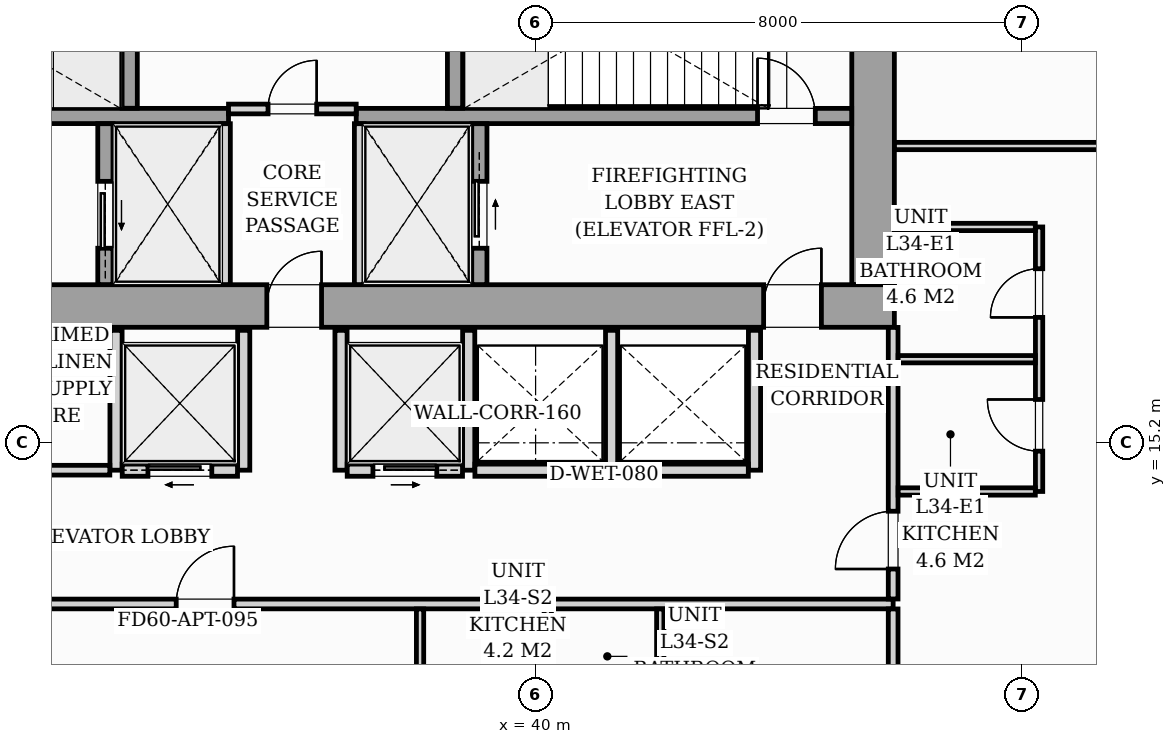
"""IFC4 building model, lengths in metres.
Left out: names, types, materials, properties, quantities, classifications, styles, units other than length and angle.
Written with IfcOpenShell. Run it as: python <this file> out.ifc"""

import sys

from ifc_helpers import new_model, si_unit, direction, frame, frame_2d, origin, origin_2d, place, context, subcontext, project, spatial, rectangle, i_section, extrude, source, transform, mapped, element, fill, save


model = new_model("IFC4")
c1 = context("Model", 3, precision=1e-05, world=origin(), true_north=direction((0.0, 1.0)))
c2 = subcontext(c1, "Body", "Model", "MODEL_VIEW")
j1 = project(units=[si_unit("LENGTHUNIT", "METRE"), si_unit("PLANEANGLEUNIT", "RADIAN")], contexts=[c1])
p1 = place(None, origin())
s1 = spatial("IfcSite", under=j1, at=p1, CompositionType="ELEMENT")
p2 = place(p1, origin())
s2 = spatial("IfcBuilding", under=s1, at=p2, CompositionType="ELEMENT")
p3 = place(p2, frame((0.0, 0.0, 119.4)))
s3 = spatial("IfcBuildingStorey", under=s2, at=p3, CompositionType="ELEMENT", Elevation=119.4)
m1 = source(origin(), c2, "Body", "SweptSolid", [
    extrude(i_section(OverallWidth=0.421, OverallDepth=0.465, WebThickness=0.045, FlangeThickness=0.073, FilletRadius=0.018, at=origin_2d()), origin(), (0.0, 0.0, 1.0), 5.196),
])
for number, where, z_axis, x_axis in (
    (1, (33.12, 17.4, 0.002), (0.0, 0.0, 1.0), (1.0, 0.0, 0.0)),
    (2, (38.88, 17.4, 0.002), (0.0, 0.0, 1.0), (1.0, 0.0, 0.0)),
    (3, (45.6, 17.4, 0.002), (0.0, 0.0, 1.0), (1.0, 0.0, 0.0)),
):
    element("IfcColumn", number, at=place(p3, frame(where, z_axis=z_axis, x_axis=x_axis)), inside=s3, PredefinedType="PILASTER", context=c2, shape_type="MappedRepresentation", body=[
        mapped(m1, transform((0.0, 0.0, 0.0), scale=1.0)),
    ])
p4 = place(p3, frame((26.1, 17.45, 0.0), z_axis=(0.0, 0.0, 1.0), x_axis=(1.0, 0.0, 0.0)))
e4 = element("IfcWall", 4, at=p4, inside=s3, PredefinedType="SHEAR", context=c2, shape_type="SweptSolid", body=[
    extrude(rectangle(XDim=19.8, YDim=0.7, at=frame_2d((9.9, 0.0))), origin(), (0.0, 0.0, 1.0), 5.2),
])
p5 = place(p4, frame((1.05, 0.0, 0.0)))
e5 = element("IfcOpeningElement", 5, at=p5, cuts=e4, PredefinedType="OPENING", context=c2, shape_type="SweptSolid", body=[
    extrude(rectangle(XDim=0.95, YDim=2.06, at=frame_2d((0.475, 1.03))), frame((0.0, 0.36, 0.0), z_axis=(0.0, -1.0, 0.0), x_axis=(1.0, 0.0, 0.0)), (0.0, 0.0, 1.0), 0.72),
])
p6 = place(p4, frame((9.48, 0.0, 0.0)))
e6 = element("IfcOpeningElement", 6, at=p6, cuts=e4, PredefinedType="OPENING", context=c2, shape_type="SweptSolid", body=[
    extrude(rectangle(XDim=0.9, YDim=2.06, at=frame_2d((0.45, 1.03))), frame((0.0, 0.36, 0.0), z_axis=(0.0, -1.0, 0.0), x_axis=(1.0, 0.0, 0.0)), (0.0, 0.0, 1.0), 0.72),
])
p7 = place(p4, frame((17.65, 0.0, 0.0)))
e7 = element("IfcOpeningElement", 7, at=p7, cuts=e4, PredefinedType="OPENING", context=c2, shape_type="SweptSolid", body=[
    extrude(rectangle(XDim=0.95, YDim=2.06, at=frame_2d((0.475, 1.03))), frame((0.0, 0.36, 0.0), z_axis=(0.0, -1.0, 0.0), x_axis=(1.0, 0.0, 0.0)), (0.0, 0.0, 1.0), 0.72),
])
p8 = place(p3, frame((45.55, 17.802, 0.0), z_axis=(0.0, 0.0, 1.0), x_axis=(0.0, 1.0, 0.0)))
e8 = element("IfcWall", 8, at=p8, inside=s3, PredefinedType="SHEAR", context=c2, shape_type="SweptSolid", body=[
    extrude(rectangle(XDim=5.796, YDim=0.7, at=frame_2d((2.898, 0.0))), origin(), (0.0, 0.0, 1.0), 5.2),
])
p9 = place(p3, frame((26.802, 20.575, 0.0), z_axis=(0.0, 0.0, 1.0), x_axis=(1.0, 0.0, 0.0)))
e9 = element("IfcWall", 9, at=p9, inside=s3, PredefinedType="SOLIDWALL", context=c2, shape_type="SweptSolid", body=[
    extrude(rectangle(XDim=8.148, YDim=0.25, at=frame_2d((4.074, 0.0))), origin(), (0.0, 0.0, 1.0), 5.2),
])
p10 = place(p9, frame((0.348, 0.0, 0.0)))
e10 = element("IfcOpeningElement", 10, at=p10, cuts=e9, PredefinedType="OPENING", context=c2, shape_type="SweptSolid", body=[
    extrude(rectangle(XDim=0.95, YDim=2.06, at=frame_2d((0.475, 1.03))), frame((0.0, 0.135, 0.0), z_axis=(0.0, -1.0, 0.0), x_axis=(1.0, 0.0, 0.0)), (0.0, 0.0, 1.0), 0.27),
])
p11 = place(p3, frame((37.05, 20.575, 0.0), z_axis=(0.0, 0.0, 1.0), x_axis=(1.0, 0.0, 0.0)))
e11 = element("IfcWall", 11, at=p11, inside=s3, PredefinedType="SOLIDWALL", context=c2, shape_type="SweptSolid", body=[
    extrude(rectangle(XDim=8.148, YDim=0.25, at=frame_2d((4.074, 0.0))), origin(), (0.0, 0.0, 1.0), 5.2),
])
p12 = place(p11, frame((6.6, 0.0, 0.0)))
e12 = element("IfcOpeningElement", 12, at=p12, cuts=e11, PredefinedType="OPENING", context=c2, shape_type="SweptSolid", body=[
    extrude(rectangle(XDim=0.95, YDim=2.06, at=frame_2d((0.475, 1.03))), frame((0.0, 0.135, 0.0), z_axis=(0.0, -1.0, 0.0), x_axis=(1.0, 0.0, 0.0)), (0.0, 0.0, 1.0), 0.27),
])
for number, where, z_axis, x_axis in (
    (13, (33.325, 20.702, 0.0), (0.0, 0.0, 1.0), (0.0, 1.0, 0.0)),
    (14, (38.675, 20.702, 0.0), (0.0, 0.0, 1.0), (0.0, 1.0, 0.0)),
):
    element("IfcWall", number, at=place(p3, frame(where, z_axis=z_axis, x_axis=x_axis)), inside=s3, PredefinedType="SOLIDWALL", context=c2, shape_type="SweptSolid", body=[
        extrude(rectangle(XDim=2.896, YDim=0.25, at=frame_2d((1.448, 0.0))), origin(), (0.0, 0.0, 1.0), 5.2),
    ])
p13 = place(p3, frame((32.925, 17.802, 0.0), z_axis=(0.0, 0.0, 1.0), x_axis=(0.0, 1.0, 0.0)))
e15 = element("IfcWall", 15, at=p13, inside=s3, PredefinedType="SOLIDWALL", context=c2, shape_type="SweptSolid", body=[
    extrude(rectangle(XDim=2.646, YDim=0.25, at=frame_2d((1.323, 0.0))), origin(), (0.0, 0.0, 1.0), 5.2),
])
p14 = place(p13, frame((0.598, 0.0, 0.0)))
e16 = element("IfcOpeningElement", 16, at=p14, cuts=e15, PredefinedType="OPENING", context=c2, shape_type="SweptSolid", body=[
    extrude(rectangle(XDim=1.1, YDim=2.08, at=frame_2d((0.55, 1.04))), frame((0.0, 0.135, 0.0), z_axis=(0.0, -1.0, 0.0), x_axis=(1.0, 0.0, 0.0)), (0.0, 0.0, 1.0), 0.27),
])
for number, where, z_axis, x_axis in (
    (17, (34.9, 17.802, 0.0), (0.0, 0.0, 1.0), (0.0, 1.0, 0.0)),
    (18, (37.1, 17.802, 0.0), (0.0, 0.0, 1.0), (0.0, 1.0, 0.0)),
):
    element("IfcWall", number, at=place(p3, frame(where, z_axis=z_axis, x_axis=x_axis)), inside=s3, PredefinedType="PARTITIONING", context=c2, shape_type="SweptSolid", body=[
        extrude(rectangle(XDim=2.646, YDim=0.16, at=frame_2d((1.323, 0.0))), origin(), (0.0, 0.0, 1.0), 4.78),
    ])
p15 = place(p3, frame((39.075, 17.802, 0.0), z_axis=(0.0, 0.0, 1.0), x_axis=(0.0, 1.0, 0.0)))
e19 = element("IfcWall", 19, at=p15, inside=s3, PredefinedType="SOLIDWALL", context=c2, shape_type="SweptSolid", body=[
    extrude(rectangle(XDim=2.646, YDim=0.25, at=frame_2d((1.323, 0.0))), origin(), (0.0, 0.0, 1.0), 5.2),
])
p16 = place(p15, frame((0.598, 0.0, 0.0)))
e20 = element("IfcOpeningElement", 20, at=p16, cuts=e19, PredefinedType="OPENING", context=c2, shape_type="SweptSolid", body=[
    extrude(rectangle(XDim=1.1, YDim=2.08, at=frame_2d((0.55, 1.04))), frame((0.0, 0.135, 0.0), z_axis=(0.0, -1.0, 0.0), x_axis=(1.0, 0.0, 0.0)), (0.0, 0.0, 1.0), 0.27),
])
p17 = place(p3, frame((34.95, 20.69, 0.0), z_axis=(0.0, 0.0, 1.0), x_axis=(1.0, 0.0, 0.0)))
e21 = element("IfcWall", 21, at=p17, inside=s3, PredefinedType="PARTITIONING", context=c2, shape_type="SweptSolid", body=[
    extrude(rectangle(XDim=2.1, YDim=0.16, at=frame_2d((1.05, 0.0))), origin(), (0.0, 0.0, 1.0), 4.78),
])
p18 = place(p17, frame((0.65, 0.0, 0.0)))
e22 = element("IfcOpeningElement", 22, at=p18, cuts=e21, PredefinedType="OPENING", context=c2, shape_type="SweptSolid", body=[
    extrude(rectangle(XDim=0.8, YDim=2.05, at=frame_2d((0.4, 1.025))), frame((0.0, 0.09, 0.0), z_axis=(0.0, -1.0, 0.0), x_axis=(1.0, 0.0, 0.0)), (0.0, 0.0, 1.0), 0.18),
])
p19 = place(p3, frame((33.1, 14.75, 0.0), z_axis=(0.0, 0.0, 1.0), x_axis=(0.0, 1.0, 0.0)))
e23 = element("IfcWall", 23, at=p19, inside=s3, PredefinedType="PARTITIONING", context=c2, shape_type="SweptSolid", body=[
    extrude(rectangle(XDim=2.3, YDim=0.2, at=frame_2d((1.15, 0.0))), origin(), (0.0, 0.0, 1.0), 4.78),
])
p20 = place(p3, frame((28.482, 14.75, 0.0), z_axis=(0.0, 0.0, 1.0), x_axis=(1.0, 0.0, 0.0)))
e24 = element("IfcWall", 24, at=p20, inside=s3, PredefinedType="PARTITIONING", context=c2, shape_type="SweptSolid", body=[
    extrude(rectangle(XDim=4.516, YDim=0.16, at=frame_2d((2.258, 0.0))), origin(), (0.0, 0.0, 1.0), 4.78),
])
p21 = place(p20, frame((1.868, 0.0, 0.0)))
e25 = element("IfcOpeningElement", 25, at=p21, cuts=e24, PredefinedType="OPENING", context=c2, shape_type="SweptSolid", body=[
    extrude(rectangle(XDim=0.8, YDim=2.05, at=frame_2d((0.4, 1.025))), frame((0.0, 0.09, 0.0), z_axis=(0.0, -1.0, 0.0), x_axis=(1.0, 0.0, 0.0)), (0.0, 0.0, 1.0), 0.18),
])
p22 = place(p3, frame((35.2, 14.75, 0.0), z_axis=(0.0, 0.0, 1.0), x_axis=(0.0, 1.0, 0.0)))
e26 = element("IfcWall", 26, at=p22, inside=s3, PredefinedType="PARTITIONING", context=c2, shape_type="SweptSolid", body=[
    extrude(rectangle(XDim=2.3, YDim=0.2, at=frame_2d((1.15, 0.0))), origin(), (0.0, 0.0, 1.0), 4.78),
])
p23 = place(p3, frame((33.202, 14.75, 0.0), z_axis=(0.0, 0.0, 1.0), x_axis=(1.0, 0.0, 0.0)))
e27 = element("IfcWall", 27, at=p23, inside=s3, PredefinedType="PARTITIONING", context=c2, shape_type="SweptSolid", body=[
    extrude(rectangle(XDim=1.896, YDim=0.2, at=frame_2d((0.948, 0.0))), origin(), (0.0, 0.0, 1.0), 4.78),
])
p24 = place(p23, frame((0.423, 0.0, 0.0)))
e28 = element("IfcOpeningElement", 28, at=p24, cuts=e27, PredefinedType="OPENING", context=c2, shape_type="SweptSolid", body=[
    extrude(rectangle(XDim=1.05, YDim=2.08, at=frame_2d((0.525, 1.04))), frame((0.0, 0.11, 0.0), z_axis=(0.0, -1.0, 0.0), x_axis=(1.0, 0.0, 0.0)), (0.0, 0.0, 1.0), 0.22),
])
for number, where, z_axis, x_axis in (
    (29, (36.8, 14.75, 0.0), (0.0, 0.0, 1.0), (0.0, 1.0, 0.0)),
    (30, (38.9, 14.75, 0.0), (0.0, 0.0, 1.0), (0.0, 1.0, 0.0)),
):
    element("IfcWall", number, at=place(p3, frame(where, z_axis=z_axis, x_axis=x_axis)), inside=s3, PredefinedType="PARTITIONING", context=c2, shape_type="SweptSolid", body=[
        extrude(rectangle(XDim=2.3, YDim=0.2, at=frame_2d((1.15, 0.0))), origin(), (0.0, 0.0, 1.0), 4.78),
    ])
p25 = place(p3, frame((36.902, 14.75, 0.0), z_axis=(0.0, 0.0, 1.0), x_axis=(1.0, 0.0, 0.0)))
e31 = element("IfcWall", 31, at=p25, inside=s3, PredefinedType="PARTITIONING", context=c2, shape_type="SweptSolid", body=[
    extrude(rectangle(XDim=1.896, YDim=0.2, at=frame_2d((0.948, 0.0))), origin(), (0.0, 0.0, 1.0), 4.78),
])
p26 = place(p25, frame((0.423, 0.0, 0.0)))
e32 = element("IfcOpeningElement", 32, at=p26, cuts=e31, PredefinedType="OPENING", context=c2, shape_type="SweptSolid", body=[
    extrude(rectangle(XDim=1.05, YDim=2.08, at=frame_2d((0.525, 1.04))), frame((0.0, 0.11, 0.0), z_axis=(0.0, -1.0, 0.0), x_axis=(1.0, 0.0, 0.0)), (0.0, 0.0, 1.0), 0.22),
])
for number, where, z_axis, x_axis in (
    (33, (41.25, 14.75, 0.0), (0.0, 0.0, 1.0), (0.0, 1.0, 0.0)),
    (34, (43.6, 14.75, 0.0), (0.0, 0.0, 1.0), (0.0, 1.0, 0.0)),
):
    element("IfcWall", number, at=place(p3, frame(where, z_axis=z_axis, x_axis=x_axis)), inside=s3, PredefinedType="PARTITIONING", context=c2, shape_type="SweptSolid", body=[
        extrude(rectangle(XDim=2.3, YDim=0.2, at=frame_2d((1.15, 0.0))), origin(), (0.0, 0.0, 1.0), 4.78),
    ])
for number, where, z_axis, x_axis in (
    (35, (39.002, 14.75, 0.0), (0.0, 0.0, 1.0), (1.0, 0.0, 0.0)),
    (36, (41.352, 14.75, 0.0), (0.0, 0.0, 1.0), (1.0, 0.0, 0.0)),
):
    element("IfcWall", number, at=place(p3, frame(where, z_axis=z_axis, x_axis=x_axis)), inside=s3, PredefinedType="PARTITIONING", context=c2, shape_type="SweptSolid", body=[
        extrude(rectangle(XDim=2.146, YDim=0.2, at=frame_2d((1.073, 0.0))), origin(), (0.0, 0.0, 1.0), 4.78),
    ])
p27 = place(p3, frame((22.05, 12.55, 0.0), z_axis=(0.0, 0.0, 1.0), x_axis=(1.0, 0.0, 0.0)))
e37 = element("IfcWall", 37, at=p27, inside=s3, PredefinedType="PARTITIONING", context=c2, shape_type="SweptSolid", body=[
    extrude(rectangle(XDim=23.83, YDim=0.16, at=frame_2d((11.915, 0.0))), origin(), (0.0, 0.0, 1.0), 4.78),
])
p28 = place(p27, frame((0.655, 0.0, 0.0)))
e38 = element("IfcOpeningElement", 38, at=p28, cuts=e37, PredefinedType="OPENING", context=c2, shape_type="SweptSolid", body=[
    extrude(rectangle(XDim=0.95, YDim=2.06, at=frame_2d((0.475, 1.03))), frame((0.0, 0.09, 0.0), z_axis=(0.0, -1.0, 0.0), x_axis=(1.0, 0.0, 0.0)), (0.0, 0.0, 1.0), 0.18),
])
p29 = place(p27, frame((12.04, 0.0, 0.0)))
e39 = element("IfcOpeningElement", 39, at=p29, cuts=e37, PredefinedType="OPENING", context=c2, shape_type="SweptSolid", body=[
    extrude(rectangle(XDim=0.95, YDim=2.06, at=frame_2d((0.475, 1.03))), frame((0.0, 0.09, 0.0), z_axis=(0.0, -1.0, 0.0), x_axis=(1.0, 0.0, 0.0)), (0.0, 0.0, 1.0), 0.18),
])
p30 = place(p3, frame((45.88, 5.776, 0.0), z_axis=(0.0, 0.0, 1.0), x_axis=(0.0, 1.0, 0.0)))
e40 = element("IfcWall", 40, at=p30, inside=s3, PredefinedType="PARTITIONING", context=c2, shape_type="SweptSolid", body=[
    extrude(rectangle(XDim=6.692, YDim=0.16, at=frame_2d((3.346, 0.0))), origin(), (0.0, 0.0, 1.0), 4.78),
])
p31 = place(p3, frame((45.88, 12.632, 0.0), z_axis=(0.0, 0.0, 1.0), x_axis=(0.0, 1.0, 0.0)))
e41 = element("IfcWall", 41, at=p31, inside=s3, PredefinedType="PARTITIONING", context=c2, shape_type="SweptSolid", body=[
    extrude(rectangle(XDim=4.466, YDim=0.16, at=frame_2d((2.233, 0.0))), origin(), (0.0, 0.0, 1.0), 4.78),
])
p32 = place(p31, frame((0.493, 0.0, 0.0)))
e42 = element("IfcOpeningElement", 42, at=p32, cuts=e41, PredefinedType="OPENING", context=c2, shape_type="SweptSolid", body=[
    extrude(rectangle(XDim=0.95, YDim=2.06, at=frame_2d((0.475, 1.03))), frame((0.0, 0.09, 0.0), z_axis=(0.0, -1.0, 0.0), x_axis=(1.0, 0.0, 0.0)), (0.0, 0.0, 1.0), 0.18),
])
p33 = place(p3, frame((42.05, 6.327, 0.0), z_axis=(0.0, 0.0, 1.0), x_axis=(0.0, 1.0, 0.0)))
e43 = element("IfcWall", 43, at=p33, inside=s3, PredefinedType="PARTITIONING", context=c2, shape_type="SweptSolid", body=[
    extrude(rectangle(XDim=6.141, YDim=0.12, at=frame_2d((3.07, 0.0))), origin(), (0.0, 0.0, 1.0), 4.78),
])
p34 = place(p33, frame((2.873, 0.0, 0.0)))
e44 = element("IfcOpeningElement", 44, at=p34, cuts=e43, PredefinedType="OPENING", context=c2, shape_type="SweptSolid", body=[
    extrude(rectangle(XDim=0.9, YDim=2.05, at=frame_2d((0.45, 1.025))), frame((0.0, 0.07, 0.0), z_axis=(0.0, -1.0, 0.0), x_axis=(1.0, 0.0, 0.0)), (0.0, 0.0, 1.0), 0.14),
])
for number, where, z_axis, x_axis in (
    (45, (40.2, 10.362, 0.0), (0.0, 0.0, 1.0), (0.0, 1.0, 0.0)),
    (46, (38.1, 10.362, 0.0), (0.0, 0.0, 1.0), (0.0, 1.0, 0.0)),
):
    element("IfcWall", number, at=place(p3, frame(where, z_axis=z_axis, x_axis=x_axis)), inside=s3, PredefinedType="PARTITIONING", context=c2, shape_type="SweptSolid", body=[
        extrude(rectangle(XDim=2.106, YDim=0.12, at=frame_2d((1.053, 0.0))), origin(), (0.0, 0.0, 1.0), 4.78),
    ])
p35 = place(p3, frame((48.28, 14.4, 0.0), z_axis=(0.0, 0.0, 1.0), x_axis=(0.0, 1.0, 0.0)))
e47 = element("IfcWall", 47, at=p35, inside=s3, PredefinedType="PARTITIONING", context=c2, shape_type="SweptSolid", body=[
    extrude(rectangle(XDim=4.35, YDim=0.12, at=frame_2d((2.175, 0.0))), origin(), (0.0, 0.0, 1.0), 4.78),
])
p36 = place(p35, frame((0.663, 0.0, 0.0)))
e48 = element("IfcOpeningElement", 48, at=p36, cuts=e47, PredefinedType="OPENING", context=c2, shape_type="SweptSolid", body=[
    extrude(rectangle(XDim=0.85, YDim=2.05, at=frame_2d((0.425, 1.025))), frame((0.0, 0.07, 0.0), z_axis=(0.0, -1.0, 0.0), x_axis=(1.0, 0.0, 0.0)), (0.0, 0.0, 1.0), 0.14),
])
p37 = place(p35, frame((2.863, 0.0, 0.0)))
e49 = element("IfcOpeningElement", 49, at=p37, cuts=e47, PredefinedType="OPENING", context=c2, shape_type="SweptSolid", body=[
    extrude(rectangle(XDim=0.8, YDim=2.02, at=frame_2d((0.4, 1.01))), frame((0.0, 0.07, 0.0), z_axis=(0.0, -1.0, 0.0), x_axis=(1.0, 0.0, 0.0)), (0.0, 0.0, 1.0), 0.14),
])
for number, where, z_axis, x_axis in (
    (50, (45.962, 16.575, 0.0), (0.0, 0.0, 1.0), (1.0, 0.0, 0.0)),
    (51, (45.962, 14.4, 0.0), (0.0, 0.0, 1.0), (1.0, 0.0, 0.0)),
):
    element("IfcWall", number, at=place(p3, frame(where, z_axis=z_axis, x_axis=x_axis)), inside=s3, PredefinedType="PARTITIONING", context=c2, shape_type="SweptSolid", body=[
        extrude(rectangle(XDim=2.256, YDim=0.12, at=frame_2d((1.128, 0.0))), origin(), (0.0, 0.0, 1.0), 4.78),
    ])
p38 = place(p3, frame((45.902, 18.75, 0.0), z_axis=(0.0, 0.0, 1.0), x_axis=(1.0, 0.0, 0.0)))
e52 = element("IfcWall", 52, at=p38, inside=s3, PredefinedType="PARTITIONING", context=c2, shape_type="SweptSolid", body=[
    extrude(rectangle(XDim=2.316, YDim=0.12, at=frame_2d((1.158, 0.0))), origin(), (0.0, 0.0, 1.0), 4.78),
])
p39 = place(p3, frame((45.902, 20.081, 0.0), z_axis=(0.0, 0.0, 1.0), x_axis=(1.0, 0.0, 0.0)))
e53 = element("IfcWall", 53, at=p39, inside=s3, PredefinedType="PARTITIONING", context=c2, shape_type="SweptSolid", body=[
    extrude(rectangle(XDim=13.875, YDim=0.12, at=frame_2d((6.937, 0.0))), origin(), (0.0, 0.0, 1.0), 4.78),
])
p40 = place(p39, frame((6.708, 0.0, 0.0)))
e54 = element("IfcOpeningElement", 54, at=p40, cuts=e53, PredefinedType="OPENING", context=c2, shape_type="SweptSolid", body=[
    extrude(rectangle(XDim=0.85, YDim=2.05, at=frame_2d((0.425, 1.025))), frame((0.0, 0.07, 0.0), z_axis=(0.0, -1.0, 0.0), x_axis=(1.0, 0.0, 0.0)), (0.0, 0.0, 1.0), 0.14),
])
m2 = source(origin(), c2, "Body", "SweptSolid", [
    extrude(rectangle(XDim=0.9, YDim=2.06, at=frame_2d((0.45, 1.03))), frame((0.0, 0.025, 0.0), z_axis=(0.0, -1.0, 0.0), x_axis=(1.0, 0.0, 0.0)), (0.0, 0.0, 1.0), 0.05),
])
p41 = place(p6, origin())
e55 = element("IfcDoor", 55, at=p41, inside=s3, OperationType="SINGLE_SWING_RIGHT", PredefinedType="DOOR", context=c2, shape_type="MappedRepresentation", body=[
    mapped(m2, transform((0.0, 0.0, 0.0), scale=1.0)),
])
fill(e6, e55)
m3 = source(origin(), c2, "Body", "SweptSolid", [
    extrude(rectangle(XDim=0.95, YDim=2.06, at=frame_2d((0.475, 1.03))), frame((0.0, 0.025, 0.0), z_axis=(0.0, -1.0, 0.0), x_axis=(1.0, 0.0, 0.0)), (0.0, 0.0, 1.0), 0.05),
])
p42 = place(p7, origin())
e56 = element("IfcDoor", 56, at=p42, inside=s3, OperationType="SINGLE_SWING_RIGHT", PredefinedType="DOOR", context=c2, shape_type="MappedRepresentation", body=[
    mapped(m3, transform((0.0, 0.0, 0.0), scale=1.0)),
])
fill(e7, e56)
p43 = place(p12, origin())
e57 = element("IfcDoor", 57, at=p43, inside=s3, OperationType="SINGLE_SWING_LEFT", PredefinedType="DOOR", context=c2, shape_type="MappedRepresentation", body=[
    mapped(m3, transform((0.0, 0.0, 0.0), scale=1.0)),
])
fill(e12, e57)
m4 = source(origin(), c2, "Body", "SweptSolid", [
    extrude(rectangle(XDim=1.1, YDim=2.08, at=frame_2d((0.55, 1.04))), frame((0.0, 0.025, 0.0), z_axis=(0.0, -1.0, 0.0), x_axis=(1.0, 0.0, 0.0)), (0.0, 0.0, 1.0), 0.05),
])
p44 = place(p14, origin())
e58 = element("IfcDoor", 58, at=p44, inside=s3, OperationType="SLIDING_TO_LEFT", PredefinedType="DOOR", context=c2, shape_type="MappedRepresentation", body=[
    mapped(m4, transform((0.0, 0.0, 0.0), scale=1.0)),
])
fill(e16, e58)
p45 = place(p16, origin())
e59 = element("IfcDoor", 59, at=p45, inside=s3, OperationType="SLIDING_TO_RIGHT", PredefinedType="DOOR", context=c2, shape_type="MappedRepresentation", body=[
    mapped(m4, transform((0.0, 0.0, 0.0), scale=1.0)),
])
fill(e20, e59)
m5 = source(origin(), c2, "Body", "SweptSolid", [
    extrude(rectangle(XDim=0.8, YDim=2.05, at=frame_2d((0.4, 1.025))), frame((0.0, 0.025, 0.0), z_axis=(0.0, -1.0, 0.0), x_axis=(1.0, 0.0, 0.0)), (0.0, 0.0, 1.0), 0.05),
])
p46 = place(p18, origin())
e60 = element("IfcDoor", 60, at=p46, inside=s3, OperationType="SINGLE_SWING_RIGHT", PredefinedType="DOOR", context=c2, shape_type="MappedRepresentation", body=[
    mapped(m5, transform((0.0, 0.0, 0.0), scale=1.0)),
])
fill(e22, e60)
m6 = source(origin(), c2, "Body", "SweptSolid", [
    extrude(rectangle(XDim=1.05, YDim=2.08, at=frame_2d((0.525, 1.04))), frame((0.0, 0.025, 0.0), z_axis=(0.0, -1.0, 0.0), x_axis=(1.0, 0.0, 0.0)), (0.0, 0.0, 1.0), 0.05),
])
p47 = place(p24, origin())
e61 = element("IfcDoor", 61, at=p47, inside=s3, OperationType="SLIDING_TO_LEFT", PredefinedType="DOOR", context=c2, shape_type="MappedRepresentation", body=[
    mapped(m6, transform((0.0, 0.0, 0.0), scale=1.0)),
])
fill(e28, e61)
p48 = place(p26, origin())
e62 = element("IfcDoor", 62, at=p48, inside=s3, OperationType="SLIDING_TO_RIGHT", PredefinedType="DOOR", context=c2, shape_type="MappedRepresentation", body=[
    mapped(m6, transform((0.0, 0.0, 0.0), scale=1.0)),
])
fill(e32, e62)
m7 = source(origin(), c2, "Body", "SweptSolid", [
    extrude(rectangle(XDim=0.95, YDim=2.06, at=frame_2d((0.475, 1.03))), frame((0.0, 0.025, 0.0), z_axis=(0.0, -1.0, 0.0), x_axis=(1.0, 0.0, 0.0)), (0.0, 0.0, 1.0), 0.05),
])
p49 = place(p29, origin())
e63 = element("IfcDoor", 63, at=p49, inside=s3, OperationType="SINGLE_SWING_RIGHT", PredefinedType="DOOR", context=c2, shape_type="MappedRepresentation", body=[
    mapped(m7, transform((0.0, 0.0, 0.0), scale=1.0)),
])
fill(e39, e63)
p50 = place(p32, origin())
e64 = element("IfcDoor", 64, at=p50, inside=s3, OperationType="SINGLE_SWING_LEFT", PredefinedType="DOOR", context=c2, shape_type="MappedRepresentation", body=[
    mapped(m7, transform((0.0, 0.0, 0.0), scale=1.0)),
])
fill(e42, e64)
m8 = source(origin(), c2, "Body", "SweptSolid", [
    extrude(rectangle(XDim=0.85, YDim=2.05, at=frame_2d((0.425, 1.025))), frame((0.0, 0.025, 0.0), z_axis=(0.0, -1.0, 0.0), x_axis=(1.0, 0.0, 0.0)), (0.0, 0.0, 1.0), 0.05),
])
p51 = place(p36, origin())
e65 = element("IfcDoor", 65, at=p51, inside=s3, OperationType="SINGLE_SWING_RIGHT", PredefinedType="DOOR", context=c2, shape_type="MappedRepresentation", body=[
    mapped(m8, transform((0.0, 0.0, 0.0), scale=1.0)),
])
fill(e48, e65)
m9 = source(origin(), c2, "Body", "SweptSolid", [
    extrude(rectangle(XDim=0.8, YDim=2.02, at=frame_2d((0.4, 1.01))), frame((0.0, 0.025, 0.0), z_axis=(0.0, -1.0, 0.0), x_axis=(1.0, 0.0, 0.0)), (0.0, 0.0, 1.0), 0.05),
])
p52 = place(p37, origin())
e66 = element("IfcDoor", 66, at=p52, inside=s3, OperationType="SINGLE_SWING_LEFT", PredefinedType="DOOR", context=c2, shape_type="MappedRepresentation", body=[
    mapped(m9, transform((0.0, 0.0, 0.0), scale=1.0)),
])
fill(e49, e66)
save(model, sys.argv[1])
